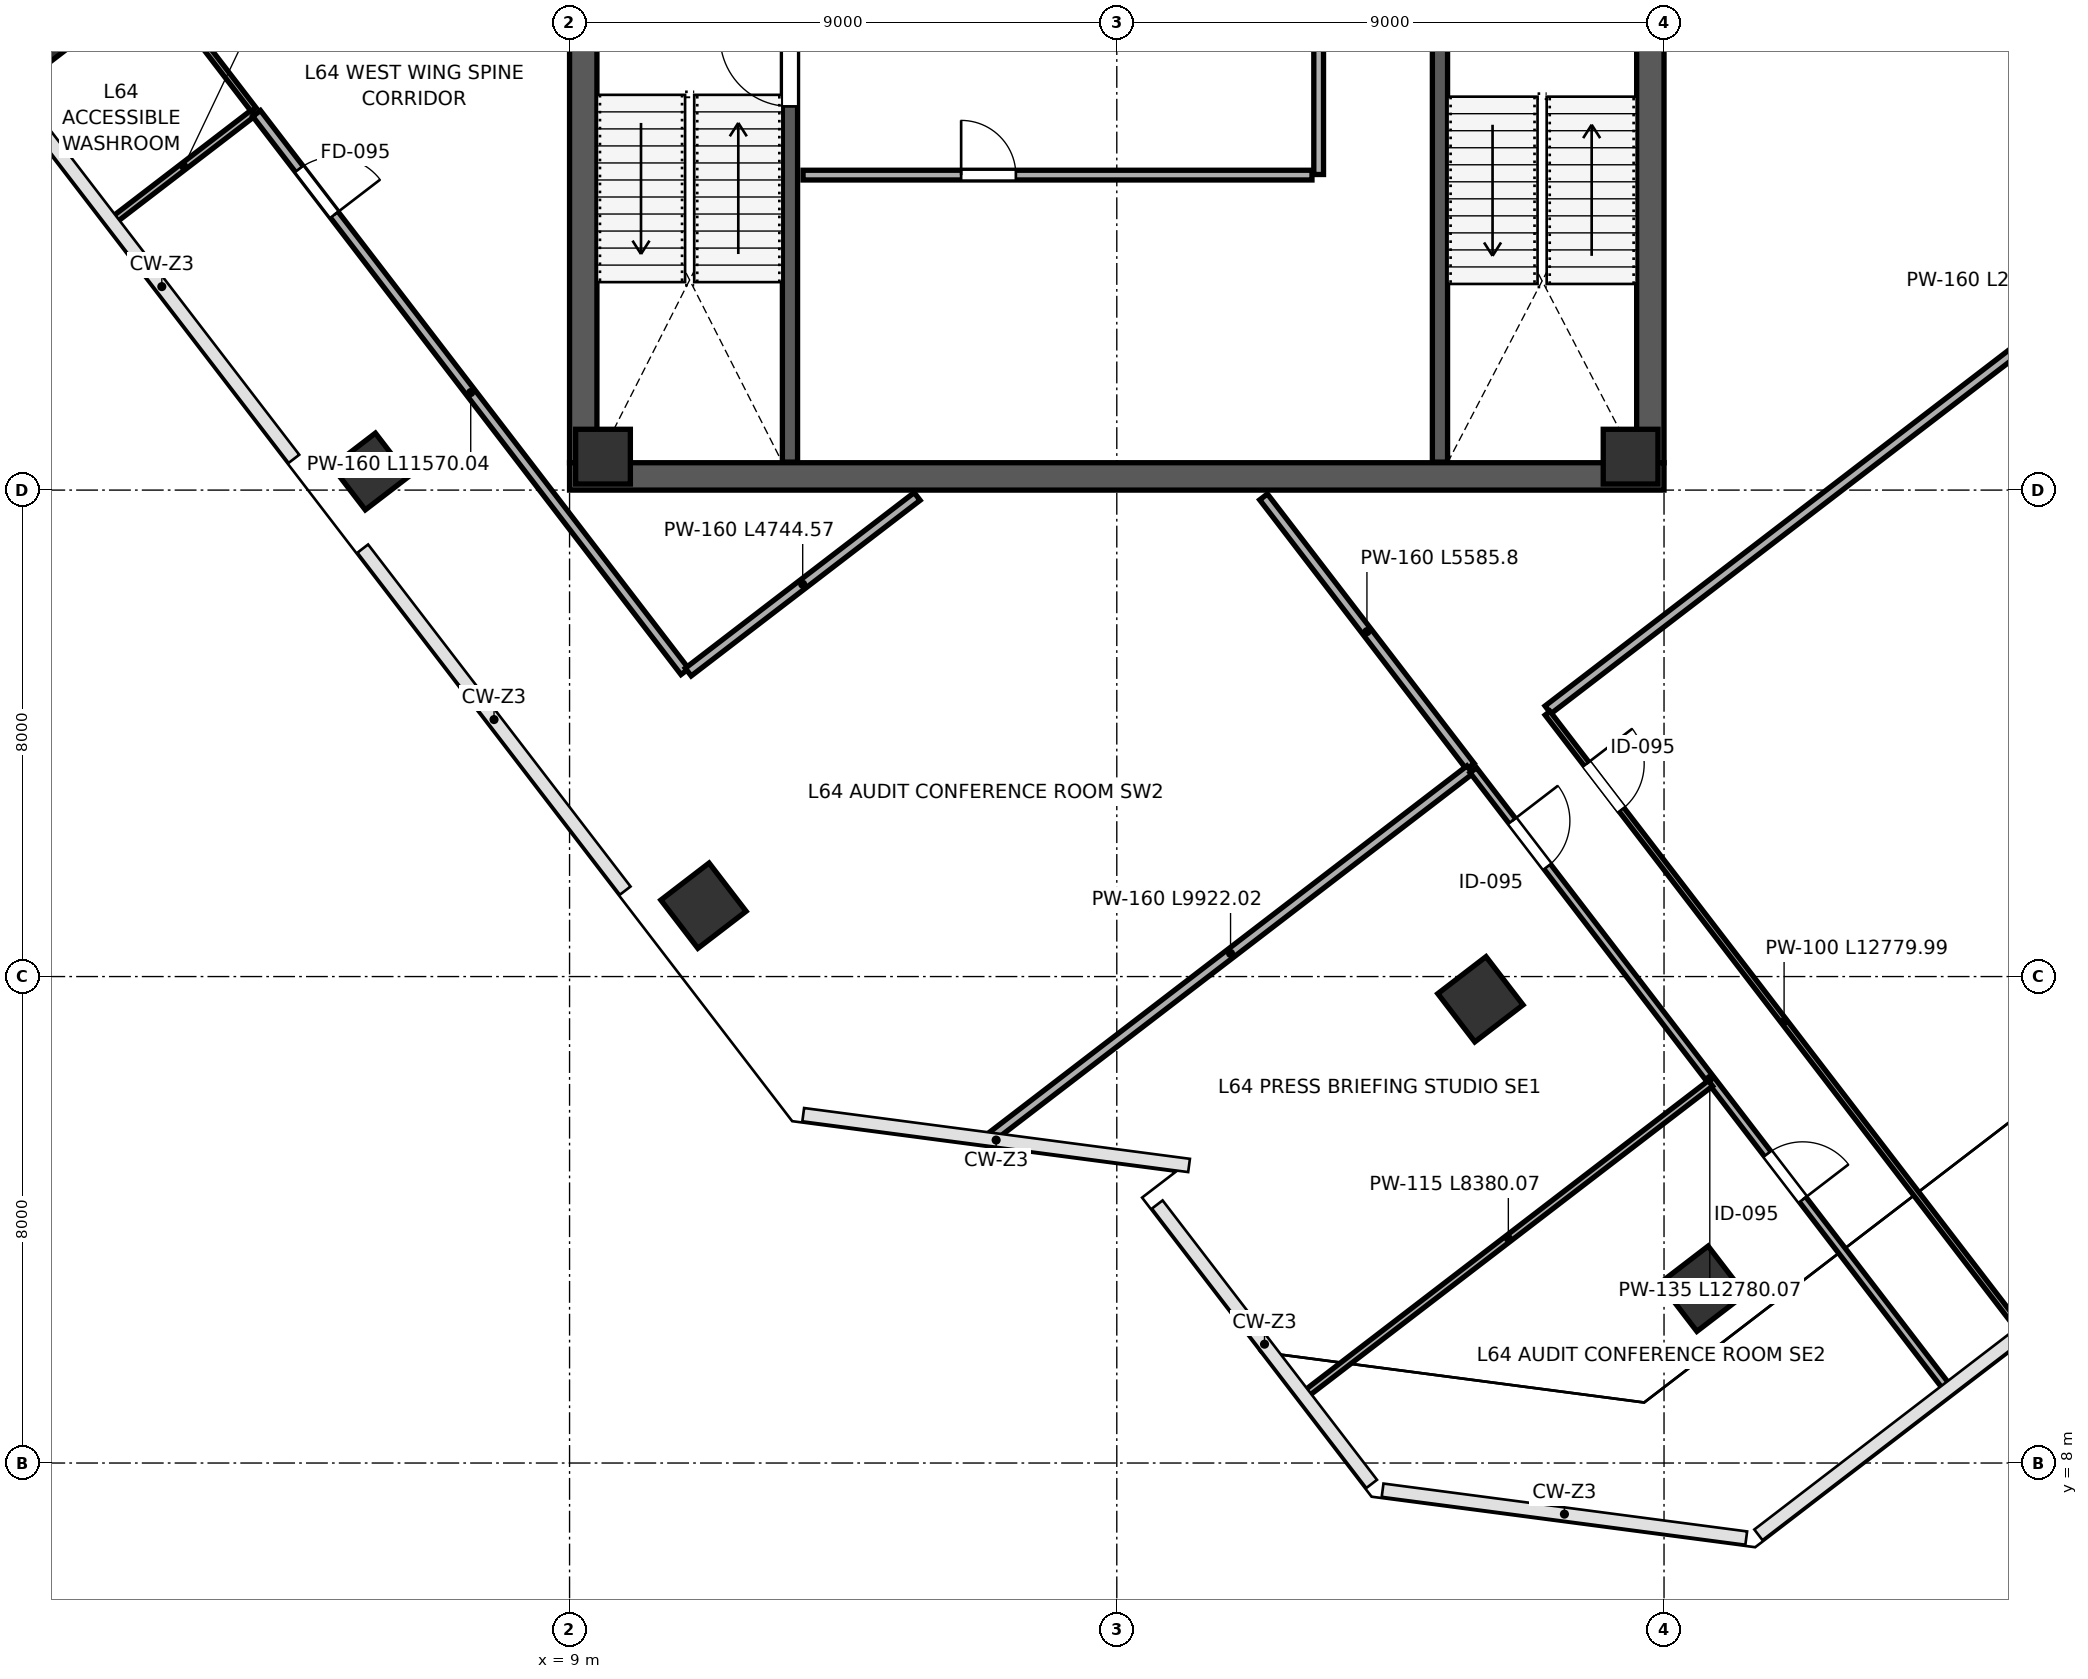
"""IFC4 building model, lengths in metres.
Left out: names, types, materials, properties, quantities, classifications, styles, units other than length and angle.
Written with IfcOpenShell. Run it as: python <this file> out.ifc"""

import sys

from ifc_helpers import new_model, si_unit, direction, frame, frame_2d, origin, origin_2d, place, context, subcontext, project, spatial, rectangle, extrude, source, transform, mapped, element, fill, save


model = new_model("IFC4")
c1 = context("Model", 3, precision=1e-05, world=origin(), true_north=direction((0.0, 1.0)))
c2 = subcontext(c1, "Body", "Model", "MODEL_VIEW")
j1 = project(units=[si_unit("LENGTHUNIT", "METRE"), si_unit("PLANEANGLEUNIT", "RADIAN")], contexts=[c1])
p1 = place(None, origin())
s1 = spatial("IfcSite", under=j1, at=p1, CompositionType="ELEMENT")
p2 = place(p1, origin())
s2 = spatial("IfcBuilding", under=s1, at=p2, CompositionType="ELEMENT")
p3 = place(p2, frame((0.0, 0.0, 283.6)))
s3 = spatial("IfcBuildingStorey", under=s2, at=p3, CompositionType="ELEMENT", Elevation=283.6)
m1 = source(origin(), c2, "Body", "SweptSolid", [
    extrude(rectangle(XDim=0.9, YDim=0.9, at=origin_2d()), origin(), (0.0, 0.0, 1.0), 4.198),
])
for number, where, z_axis, x_axis in (
    (1, (9.55, 24.55, 0.001), (0.0, 0.0, 1.0), (1.0, 0.0, 0.0)),
    (2, (26.45, 24.55, 0.001), (0.0, 0.0, 1.0), (1.0, 0.0, 0.0)),
):
    element("IfcColumn", number, at=place(p3, frame(where, z_axis=z_axis, x_axis=x_axis)), inside=s3, PredefinedType="COLUMN", context=c2, shape_type="MappedRepresentation", body=[
        mapped(m1, transform((0.0, 0.0, 0.0), scale=1.0)),
    ])
m2 = source(origin(), c2, "Body", "SweptSolid", [
    extrude(rectangle(XDim=0.9, YDim=0.9, at=origin_2d()), origin(), (0.0, 0.0, 1.0), 4.198),
])
for number, where, z_axis, x_axis in (
    (3, (0.245, 31.446, 0.001), (0.0, 0.0, 1.0), (-0.609, 0.793, 0.0)),
    (4, (5.724, 24.306, 0.001), (0.0, 0.0, 1.0), (-0.609, 0.793, 0.0)),
):
    element("IfcColumn", number, at=place(p3, frame(where, z_axis=z_axis, x_axis=x_axis)), inside=s3, PredefinedType="COLUMN", context=c2, shape_type="MappedRepresentation", body=[
        mapped(m2, transform((0.0, 0.0, 0.0), scale=1.0)),
    ])
m3 = source(origin(), c2, "Body", "SweptSolid", [
    extrude(rectangle(XDim=1.0, YDim=1.0, at=origin_2d()), origin(), (0.0, 0.0, 1.0), 4.198),
])
p4 = place(p3, frame((11.202, 17.166, 0.001), z_axis=(0.0, 0.0, 1.0), x_axis=(-0.608761429009, 0.793353340291, 0.0)))
e5 = element("IfcColumn", 5, at=p4, inside=s3, PredefinedType="COLUMN", context=c2, shape_type="MappedRepresentation", body=[
    mapped(m3, transform((0.0, 0.0, 0.0), scale=1.0)),
])
m4 = source(origin(), c2, "Body", "SweptSolid", [
    extrude(rectangle(XDim=1.0, YDim=1.0, at=origin_2d()), origin(), (0.0, 0.0, 1.0), 4.198),
])
p5 = place(p3, frame((23.98, 15.626, 0.001), z_axis=(0.0, 0.0, 1.0), x_axis=(-0.608761429009, 0.793353340291, 0.0)))
e6 = element("IfcColumn", 6, at=p5, inside=s3, PredefinedType="COLUMN", context=c2, shape_type="MappedRepresentation", body=[
    mapped(m4, transform((0.0, 0.0, 0.0), scale=1.0)),
])
p6 = place(p3, frame((27.633, 10.866, 0.001), z_axis=(0.0, 0.0, 1.0), x_axis=(-0.608761429009, 0.793353340291, 0.0)))
e7 = element("IfcColumn", 7, at=p6, inside=s3, PredefinedType="COLUMN", context=c2, shape_type="MappedRepresentation", body=[
    mapped(m3, transform((0.0, 0.0, 0.0), scale=1.0)),
])
p7 = place(p3, frame((9.225, 24.45, 0.0), z_axis=(0.0, 0.0, 1.0), x_axis=(0.0, 1.0, 0.0)))
e8 = element("IfcWall", 8, at=p7, inside=s3, PredefinedType="SHEAR", context=c2, shape_type="SweptSolid", body=[
    extrude(rectangle(XDim=15.1, YDim=0.45, at=frame_2d((7.55, 0.0))), origin(), (0.0, 0.0, 1.0), 3.92),
])
p8 = place(p7, frame((8.7, 0.0, 0.0)))
e9 = element("IfcOpeningElement", 9, at=p8, cuts=e8, PredefinedType="OPENING", context=c2, shape_type="SweptSolid", body=[
    extrude(rectangle(XDim=1.15, YDim=2.2, at=frame_2d((0.575, 1.1))), frame((0.0, 0.235, 0.0), z_axis=(0.0, -1.0, 0.0), x_axis=(1.0, 0.0, 0.0)), (0.0, 0.0, 1.0), 0.47),
])
p9 = place(p3, frame((26.775, 24.45, 0.0), z_axis=(0.0, 0.0, 1.0), x_axis=(0.0, 1.0, 0.0)))
e10 = element("IfcWall", 10, at=p9, inside=s3, PredefinedType="SHEAR", context=c2, shape_type="SweptSolid", body=[
    extrude(rectangle(XDim=15.1, YDim=0.45, at=frame_2d((7.55, 0.0))), origin(), (0.0, 0.0, 1.0), 3.92),
])
p10 = place(p9, frame((8.6, 0.0, 0.0)))
e11 = element("IfcOpeningElement", 11, at=p10, cuts=e10, PredefinedType="OPENING", context=c2, shape_type="SweptSolid", body=[
    extrude(rectangle(XDim=1.15, YDim=2.2, at=frame_2d((0.575, 1.1))), frame((0.0, 0.235, 0.0), z_axis=(0.0, -1.0, 0.0), x_axis=(1.0, 0.0, 0.0)), (0.0, 0.0, 1.0), 0.47),
])
p11 = place(p3, frame((9.0, 24.225, 0.0), z_axis=(0.0, 0.0, 1.0), x_axis=(1.0, 0.0, 0.0)))
e12 = element("IfcWall", 12, at=p11, inside=s3, PredefinedType="SHEAR", context=c2, shape_type="SweptSolid", body=[
    extrude(rectangle(XDim=18.0, YDim=0.45, at=frame_2d((9.0, 0.0))), origin(), (0.0, 0.0, 1.0), 3.92),
])
p12 = place(p3, frame((12.625, 24.46, 0.0), z_axis=(0.0, 0.0, 1.0), x_axis=(0.0, 1.0, 0.0)))
e13 = element("IfcWall", 13, at=p12, inside=s3, PredefinedType="SHEAR", context=c2, shape_type="SweptSolid", body=[
    extrude(rectangle(XDim=7.49, YDim=0.25, at=frame_2d((3.745, 0.0))), origin(), (0.0, 0.0, 1.0), 3.92),
])
p13 = place(p12, frame((5.85, 0.0, 0.0)))
e14 = element("IfcOpeningElement", 14, at=p13, cuts=e13, PredefinedType="OPENING", context=c2, shape_type="SweptSolid", body=[
    extrude(rectangle(XDim=1.15, YDim=2.2, at=frame_2d((0.575, 1.1))), frame((0.0, 0.135, 0.0), z_axis=(0.0, -1.0, 0.0), x_axis=(1.0, 0.0, 0.0)), (0.0, 0.0, 1.0), 0.27),
])
p14 = place(p3, frame((23.315, 24.46, 0.0), z_axis=(0.0, 0.0, 1.0), x_axis=(0.0, 1.0, 0.0)))
e15 = element("IfcWall", 15, at=p14, inside=s3, PredefinedType="SHEAR", context=c2, shape_type="SweptSolid", body=[
    extrude(rectangle(XDim=7.49, YDim=0.25, at=frame_2d((3.745, 0.0))), origin(), (0.0, 0.0, 1.0), 3.92),
])
p15 = place(p3, frame((12.84, 29.18, 0.0), z_axis=(0.0, 0.0, 1.0), x_axis=(1.0, 0.0, 0.0)))
e16 = element("IfcWall", 16, at=p15, inside=s3, PredefinedType="PARTITIONING", context=c2, shape_type="SweptSolid", body=[
    extrude(rectangle(XDim=8.37, YDim=0.16, at=frame_2d((4.185, 0.0))), origin(), (0.0, 0.0, 1.0), 3.92),
])
p16 = place(p15, frame((2.6, 0.0, 0.0)))
e17 = element("IfcOpeningElement", 17, at=p16, cuts=e16, PredefinedType="OPENING", context=c2, shape_type="SweptSolid", body=[
    extrude(rectangle(XDim=0.9, YDim=2.15, at=frame_2d((0.45, 1.075))), frame((0.0, 0.09, 0.0), z_axis=(0.0, -1.0, 0.0), x_axis=(1.0, 0.0, 0.0)), (0.0, 0.0, 1.0), 0.18),
])
p17 = place(p3, frame((21.32, 29.19, 0.0), z_axis=(0.0, 0.0, 1.0), x_axis=(0.0, 1.0, 0.0)))
e18 = element("IfcWall", 18, at=p17, inside=s3, PredefinedType="PARTITIONING", context=c2, shape_type="SweptSolid", body=[
    extrude(rectangle(XDim=2.92, YDim=0.16, at=frame_2d((1.46, 0.0))), origin(), (0.0, 0.0, 1.0), 3.92),
])
p18 = place(p3, frame((-0.406, 30.947, 0.0), z_axis=(0.0, 0.0, 1.0), x_axis=(0.793370260172, 0.608739377956, 0.0)))
e19 = element("IfcWall", 19, at=p18, inside=s3, PredefinedType="PARTITIONING", context=c2, shape_type="SweptSolid", body=[
    extrude(rectangle(XDim=2.88, YDim=0.135, at=frame_2d((1.44, 0.0))), origin(), (0.0, 0.0, 1.0), 3.155),
])
p19 = place(p3, frame((1.512, 28.448, 0.0), z_axis=(0.0, 0.0, 1.0), x_axis=(0.793370260172, 0.608739377956, 0.0)))
e20 = element("IfcWall", 20, at=p19, inside=s3, PredefinedType="PARTITIONING", context=c2, shape_type="SweptSolid", body=[
    extrude(rectangle(XDim=2.88, YDim=0.115, at=frame_2d((1.44, 0.0))), origin(), (0.0, 0.0, 1.0), 3.155),
])
p20 = place(p3, frame((-0.258, 35.551, 0.0), z_axis=(0.0, 0.0, 1.0), x_axis=(0.608751837986, -0.79336069965, 0.0)))
e21 = element("IfcWall", 21, at=p20, inside=s3, PredefinedType="PARTITIONING", context=c2, shape_type="SweptSolid", body=[
    extrude(rectangle(XDim=6.672, YDim=0.1, at=frame_2d((3.336, 0.0))), origin(), (0.0, 0.0, 1.0), 3.92),
])
p21 = place(p20, frame((2.15, 0.0, 0.0)))
e22 = element("IfcOpeningElement", 22, at=p21, cuts=e21, PredefinedType="OPENING", context=c2, shape_type="SweptSolid", body=[
    extrude(rectangle(XDim=0.9, YDim=2.15, at=frame_2d((0.45, 1.075))), frame((0.0, 0.06, 0.0), z_axis=(0.0, -1.0, 0.0), x_axis=(1.0, 0.0, 0.0)), (0.0, 0.0, 1.0), 0.12),
])
p22 = place(p20, frame((4.25, 0.0, 0.0)))
e23 = element("IfcOpeningElement", 23, at=p22, cuts=e21, PredefinedType="OPENING", context=c2, shape_type="SweptSolid", body=[
    extrude(rectangle(XDim=0.95, YDim=2.15, at=frame_2d((0.475, 1.075))), frame((0.0, 0.06, 0.0), z_axis=(0.0, -1.0, 0.0), x_axis=(1.0, 0.0, 0.0)), (0.0, 0.0, 1.0), 0.12),
])
p23 = place(p3, frame((3.853, 30.194, 0.0), z_axis=(0.0, 0.0, 1.0), x_axis=(0.608748677634, -0.793363124603, 0.0)))
e24 = element("IfcWall", 24, at=p23, inside=s3, PredefinedType="PARTITIONING", context=c2, shape_type="SweptSolid", body=[
    extrude(rectangle(XDim=11.57, YDim=0.16, at=frame_2d((5.785, 0.0))), origin(), (0.0, 0.0, 1.0), 3.92),
])
p24 = place(p23, frame((1.15, 0.0, 0.0)))
e25 = element("IfcOpeningElement", 25, at=p24, cuts=e24, PredefinedType="OPENING", context=c2, shape_type="SweptSolid", body=[
    extrude(rectangle(XDim=0.95, YDim=2.15, at=frame_2d((0.475, 1.075))), frame((0.0, 0.09, 0.0), z_axis=(0.0, -1.0, 0.0), x_axis=(1.0, 0.0, 0.0)), (0.0, 0.0, 1.0), 0.18),
])
p25 = place(p3, frame((10.952, 21.007, 0.0), z_axis=(0.0, 0.0, 1.0), x_axis=(0.793369431695, 0.608740457709, 0.0)))
e26 = element("IfcWall", 26, at=p25, inside=s3, PredefinedType="PARTITIONING", context=c2, shape_type="SweptSolid", body=[
    extrude(rectangle(XDim=4.745, YDim=0.16, at=frame_2d((2.372, 0.0))), origin(), (0.0, 0.0, 1.0), 3.92),
])
p26 = place(p3, frame((20.414, 23.888, 0.0), z_axis=(0.0, 0.0, 1.0), x_axis=(0.608740736079, -0.793369218106, 0.0)))
e27 = element("IfcWall", 27, at=p26, inside=s3, PredefinedType="PARTITIONING", context=c2, shape_type="SweptSolid", body=[
    extrude(rectangle(XDim=5.585, YDim=0.16, at=frame_2d((2.793, 0.0))), origin(), (0.0, 0.0, 1.0), 3.92),
])
p27 = place(p3, frame((20.518, 50.922, 0.0), z_axis=(0.0, 0.0, 1.0), x_axis=(0.608759693778, -0.793354671778, 0.0)))
e28 = element("IfcWall", 28, at=p27, inside=s3, PredefinedType="PARTITIONING", context=c2, shape_type="SweptSolid", body=[
    extrude(rectangle(XDim=26.97, YDim=0.135, at=frame_2d((13.485, 0.0))), origin(), (0.0, 0.0, 1.0), 3.92),
])
p28 = place(p27, frame((5.4, 0.0, 0.0)))
e29 = element("IfcOpeningElement", 29, at=p28, cuts=e28, PredefinedType="OPENING", context=c2, shape_type="SweptSolid", body=[
    extrude(rectangle(XDim=0.95, YDim=2.15, at=frame_2d((0.475, 1.075))), frame((0.0, 0.078, 0.0), z_axis=(0.0, -1.0, 0.0), x_axis=(1.0, 0.0, 0.0)), (0.0, 0.0, 1.0), 0.155),
])
p29 = place(p3, frame((25.092, 20.387, 0.0), z_axis=(0.0, 0.0, 1.0), x_axis=(0.793357014217, 0.608756641025, 0.0)))
e30 = element("IfcWall", 30, at=p29, inside=s3, PredefinedType="PARTITIONING", context=c2, shape_type="SweptSolid", body=[
    extrude(rectangle(XDim=20.24, YDim=0.16, at=frame_2d((10.12, 0.0))), origin(), (0.0, 0.0, 1.0), 3.155),
])
p30 = place(p3, frame((15.935, 13.361, 0.0), z_axis=(0.0, 0.0, 1.0), x_axis=(0.793355203048, 0.608759001409, 0.0)))
e31 = element("IfcWall", 31, at=p30, inside=s3, PredefinedType="PARTITIONING", context=c2, shape_type="SweptSolid", body=[
    extrude(rectangle(XDim=9.922, YDim=0.16, at=frame_2d((4.961, 0.0))), origin(), (0.0, 0.0, 1.0), 3.92),
])
p31 = place(p3, frame((25.085, 20.331, 0.0), z_axis=(0.0, 0.0, 1.0), x_axis=(0.608748325205, -0.793363395022, 0.0)))
e32 = element("IfcWall", 32, at=p31, inside=s3, PredefinedType="PARTITIONING", context=c2, shape_type="SweptSolid", body=[
    extrude(rectangle(XDim=12.78, YDim=0.1, at=frame_2d((6.39, 0.0))), origin(), (0.0, 0.0, 1.0), 3.212),
])
p32 = place(p31, frame((1.05, 0.0, 0.0)))
e33 = element("IfcOpeningElement", 33, at=p32, cuts=e32, PredefinedType="OPENING", context=c2, shape_type="SweptSolid", body=[
    extrude(rectangle(XDim=0.95, YDim=2.15, at=frame_2d((0.475, 1.075))), frame((0.0, 0.06, 0.0), z_axis=(0.0, -1.0, 0.0), x_axis=(1.0, 0.0, 0.0)), (0.0, 0.0, 1.0), 0.12),
])
p33 = place(p3, frame((23.863, 19.393, 0.0), z_axis=(0.0, 0.0, 1.0), x_axis=(0.608748325205, -0.793363395022, 0.0)))
e34 = element("IfcWall", 34, at=p33, inside=s3, PredefinedType="PARTITIONING", context=c2, shape_type="SweptSolid", body=[
    extrude(rectangle(XDim=12.78, YDim=0.135, at=frame_2d((6.39, 0.0))), origin(), (0.0, 0.0, 1.0), 3.212),
])
p34 = place(p33, frame((1.05, 0.0, 0.0)))
e35 = element("IfcOpeningElement", 35, at=p34, cuts=e34, PredefinedType="OPENING", context=c2, shape_type="SweptSolid", body=[
    extrude(rectangle(XDim=0.95, YDim=2.15, at=frame_2d((0.475, 1.075))), frame((0.0, 0.078, 0.0), z_axis=(0.0, -1.0, 0.0), x_axis=(1.0, 0.0, 0.0)), (0.0, 0.0, 1.0), 0.155),
])
p35 = place(p33, frame((7.95, 0.0, 0.0)))
e36 = element("IfcOpeningElement", 36, at=p35, cuts=e34, PredefinedType="OPENING", context=c2, shape_type="SweptSolid", body=[
    extrude(rectangle(XDim=0.95, YDim=2.15, at=frame_2d((0.475, 1.075))), frame((0.0, 0.078, 0.0), z_axis=(0.0, -1.0, 0.0), x_axis=(1.0, 0.0, 0.0)), (0.0, 0.0, 1.0), 0.155),
])
p36 = place(p3, frame((21.115, 9.142, 0.0), z_axis=(0.0, 0.0, 1.0), x_axis=(0.793351209169, 0.608764206331, 0.0)))
e37 = element("IfcWall", 37, at=p36, inside=s3, PredefinedType="PARTITIONING", context=c2, shape_type="SweptSolid", body=[
    extrude(rectangle(XDim=8.38, YDim=0.115, at=frame_2d((4.19, 0.0))), origin(), (0.0, 0.0, 1.0), 3.92),
])
m5 = source(origin(), c2, "Body", "SweptSolid", [
    extrude(rectangle(XDim=1.15, YDim=2.2, at=frame_2d((0.575, 1.1))), frame((0.0, 0.025, 0.0), z_axis=(0.0, -1.0, 0.0), x_axis=(1.0, 0.0, 0.0)), (0.0, 0.0, 1.0), 0.05),
])
p37 = place(p13, origin())
e38 = element("IfcDoor", 38, at=p37, inside=s3, OperationType="SINGLE_SWING_RIGHT", PredefinedType="DOOR", context=c2, shape_type="MappedRepresentation", body=[
    mapped(m5, transform((0.0, 0.0, 0.0), scale=1.0)),
])
fill(e14, e38)
m6 = source(origin(), c2, "Body", "SweptSolid", [
    extrude(rectangle(XDim=0.9, YDim=2.15, at=frame_2d((0.45, 1.075))), frame((0.0, 0.025, 0.0), z_axis=(0.0, -1.0, 0.0), x_axis=(1.0, 0.0, 0.0)), (0.0, 0.0, 1.0), 0.05),
])
p38 = place(p16, origin())
e39 = element("IfcDoor", 39, at=p38, inside=s3, OperationType="SINGLE_SWING_LEFT", PredefinedType="DOOR", context=c2, shape_type="MappedRepresentation", body=[
    mapped(m6, transform((0.0, 0.0, 0.0), scale=1.0)),
])
fill(e17, e39)
m7 = source(origin(), c2, "Body", "SweptSolid", [
    extrude(rectangle(XDim=0.95, YDim=2.15, at=frame_2d((0.475, 1.075))), frame((0.0, 0.025, 0.0), z_axis=(0.0, -1.0, 0.0), x_axis=(1.0, 0.0, 0.0)), (0.0, 0.0, 1.0), 0.05),
])
p39 = place(p24, origin())
e40 = element("IfcDoor", 40, at=p39, inside=s3, OperationType="SINGLE_SWING_RIGHT", PredefinedType="DOOR", context=c2, shape_type="MappedRepresentation", body=[
    mapped(m7, transform((0.0, 0.0, 0.0), scale=1.0)),
])
fill(e25, e40)
m8 = source(origin(), c2, "Body", "SweptSolid", [
    extrude(rectangle(XDim=0.95, YDim=2.15, at=frame_2d((0.475, 1.075))), frame((0.0, 0.025, 0.0), z_axis=(0.0, -1.0, 0.0), x_axis=(1.0, 0.0, 0.0)), (0.0, 0.0, 1.0), 0.05),
])
p40 = place(p32, origin())
e41 = element("IfcDoor", 41, at=p40, inside=s3, OperationType="SINGLE_SWING_LEFT", PredefinedType="DOOR", context=c2, shape_type="MappedRepresentation", body=[
    mapped(m8, transform((0.0, 0.0, 0.0), scale=1.0)),
])
fill(e33, e41)
p41 = place(p34, origin())
e42 = element("IfcDoor", 42, at=p41, inside=s3, OperationType="SINGLE_SWING_LEFT", PredefinedType="DOOR", context=c2, shape_type="MappedRepresentation", body=[
    mapped(m8, transform((0.0, 0.0, 0.0), scale=1.0)),
])
fill(e35, e42)
p42 = place(p35, origin())
e43 = element("IfcDoor", 43, at=p42, inside=s3, OperationType="SINGLE_SWING_RIGHT", PredefinedType="DOOR", context=c2, shape_type="MappedRepresentation", body=[
    mapped(m8, transform((0.0, 0.0, 0.0), scale=1.0)),
])
fill(e36, e43)
save(model, sys.argv[1])
